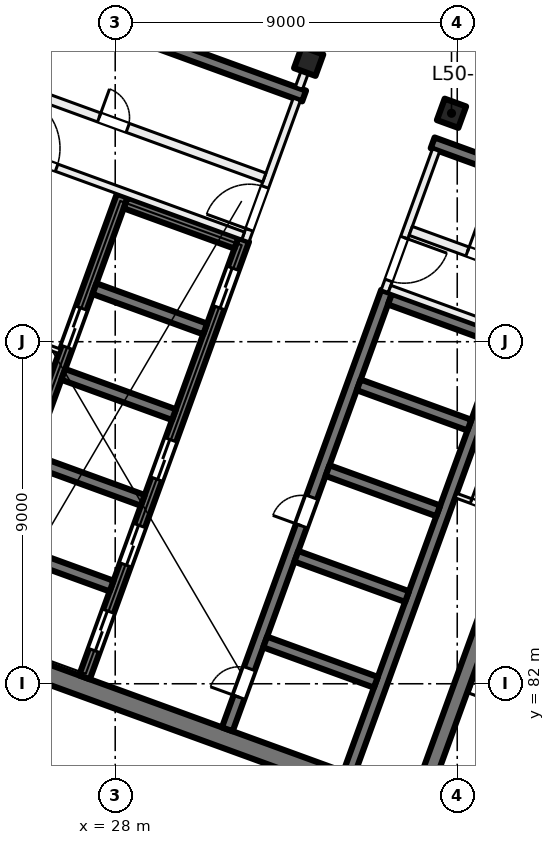
"""IFC4 building model, lengths in metres.
Left out: names, types, materials, properties, quantities, classifications, styles, units other than length and angle.
Written with IfcOpenShell. Run it as: python <this file> out.ifc"""

import sys

from ifc_helpers import new_model, si_unit, direction, frame, frame_2d, origin, origin_2d, place, context, subcontext, project, spatial, rectangle, extrude, element, fill, save


model = new_model("IFC4")
c1 = context("Model", 3, precision=1e-05, world=origin(), true_north=direction((0.0, 1.0)))
c2 = subcontext(c1, "Body", "Model", "MODEL_VIEW")
j1 = project(units=[si_unit("LENGTHUNIT", "METRE"), si_unit("PLANEANGLEUNIT", "RADIAN")], contexts=[c1])
p1 = place(None, origin())
s1 = spatial("IfcSite", under=j1, at=p1, CompositionType="ELEMENT")
p2 = place(p1, origin())
s2 = spatial("IfcBuilding", under=s1, at=p2, CompositionType="ELEMENT")
p3 = place(p2, frame((0.0, 0.0, 212.0)))
s3 = spatial("IfcBuildingStorey", under=s2, at=p3, CompositionType="ELEMENT", Elevation=212.0)
for number, where, z_axis, x_axis in (
    (1, (36.849, 97.011, 0.0), (0.0, 0.0, 1.0), (-0.342, -0.94, 0.0)),
    (2, (33.091, 98.379, 0.0), (0.0, 0.0, 1.0), (-0.342, -0.94, 0.0)),
):
    element("IfcColumn", number, at=place(p3, frame(where, z_axis=z_axis, x_axis=x_axis)), inside=s3, PredefinedType="COLUMN", context=c2, shape_type="SweptSolid", body=[
        extrude(rectangle(XDim=0.6, YDim=0.6, at=origin_2d()), origin(), (0.0, 0.0, 1.0), 4.0),
    ])
p4 = place(p3, frame((35.75, 78.788, 0.0), z_axis=(0.0, 0.0, 1.0), x_axis=(-0.939692894512, 0.342019391267, 0.0)))
e3 = element("IfcWall", 3, at=p4, inside=s3, PredefinedType="SHEAR", context=c2, shape_type="SweptSolid", body=[
    extrude(rectangle(XDim=14.4, YDim=0.5, at=frame_2d((7.2, 0.0))), origin(), (0.0, 0.0, 1.0), 4.0),
])
p5 = place(p3, frame((36.058, 79.048, 0.0), z_axis=(0.0, 0.0, 1.0), x_axis=(0.342016982193, 0.939693771338, 0.0)))
e4 = element("IfcWall", 4, at=p5, inside=s3, PredefinedType="SHEAR", context=c2, shape_type="SweptSolid", body=[
    extrude(rectangle(XDim=7.8, YDim=0.4, at=frame_2d((3.9, 0.0))), origin(), (0.0, 0.0, 1.0), 4.0),
])
p6 = place(p3, frame((30.949, 80.801, 0.0), z_axis=(0.0, 0.0, 1.0), x_axis=(0.342016684409, 0.939693879721, 0.0)))
e5 = element("IfcWall", 5, at=p6, inside=s3, PredefinedType="SHEAR", context=c2, shape_type="SweptSolid", body=[
    extrude(rectangle(XDim=12.25, YDim=0.3, at=frame_2d((6.125, 0.0))), origin(), (0.0, 0.0, 1.0), 4.0),
])
p7 = place(p6, frame((0.9, 0.0, 0.0)))
e6 = element("IfcOpeningElement", 6, at=p7, cuts=e5, PredefinedType="OPENING", context=c2, shape_type="SweptSolid", body=[
    extrude(rectangle(XDim=0.8, YDim=2.1, at=frame_2d((0.4, 1.05))), frame((0.0, 0.16, 0.0), z_axis=(0.0, -1.0, 0.0), x_axis=(1.0, 0.0, 0.0)), (0.0, 0.0, 1.0), 0.32),
])
p8 = place(p6, frame((5.7, 0.0, 0.0)))
e7 = element("IfcOpeningElement", 7, at=p8, cuts=e5, PredefinedType="OPENING", context=c2, shape_type="SweptSolid", body=[
    extrude(rectangle(XDim=0.8, YDim=2.1, at=frame_2d((0.4, 1.05))), frame((0.0, 0.16, 0.0), z_axis=(0.0, -1.0, 0.0), x_axis=(1.0, 0.0, 0.0)), (0.0, 0.0, 1.0), 0.32),
])
p9 = place(p3, frame((34.144, 79.638, 0.0), z_axis=(0.0, 0.0, 1.0), x_axis=(0.342016684409, 0.939693879721, 0.0)))
e8 = element("IfcWall", 8, at=p9, inside=s3, PredefinedType="SHEAR", context=c2, shape_type="SweptSolid", body=[
    extrude(rectangle(XDim=12.25, YDim=0.3, at=frame_2d((6.125, 0.0))), origin(), (0.0, 0.0, 1.0), 4.0),
])
p10 = place(p3, frame((34.858, 82.039, 0.0), z_axis=(0.0, 0.0, 1.0), x_axis=(-0.939689908313, 0.342027595692, 0.0)))
e9 = element("IfcWall", 9, at=p10, inside=s3, PredefinedType="SHEAR", context=c2, shape_type="SweptSolid", body=[
    extrude(rectangle(XDim=3.1, YDim=0.3, at=frame_2d((1.55, 0.0))), origin(), (0.0, 0.0, 1.0), 4.0),
])
p11 = place(p3, frame((35.679, 84.294, 0.0), z_axis=(0.0, 0.0, 1.0), x_axis=(-0.939706007505, 0.341983361377, 0.0)))
e10 = element("IfcWall", 10, at=p11, inside=s3, PredefinedType="SHEAR", context=c2, shape_type="SweptSolid", body=[
    extrude(rectangle(XDim=3.1, YDim=0.3, at=frame_2d((1.55, 0.0))), origin(), (0.0, 0.0, 1.0), 4.0),
])
for number, where, z_axis, x_axis in (
    (11, (36.5, 86.549, 0.0), (0.0, 0.0, 1.0), (-0.94, 0.342, 0.0)),
    (12, (37.321, 88.805, 0.0), (0.0, 0.0, 1.0), (-0.94, 0.342, 0.0)),
    (13, (38.142, 91.06, 0.0), (0.0, 0.0, 1.0), (-0.94, 0.342, 0.0)),
):
    element("IfcWall", number, at=place(p3, frame(where, z_axis=z_axis, x_axis=x_axis)), inside=s3, PredefinedType="SHEAR", context=c2, shape_type="SweptSolid", body=[
        extrude(rectangle(XDim=3.1, YDim=0.3, at=frame_2d((1.55, 0.0))), origin(), (0.0, 0.0, 1.0), 4.0),
    ])
p12 = place(p3, frame((27.191, 82.169, 0.0), z_axis=(0.0, 0.0, 1.0), x_axis=(0.342016684409, 0.939693879721, 0.0)))
e14 = element("IfcWall", 14, at=p12, inside=s3, PredefinedType="SHEAR", context=c2, shape_type="SweptSolid", body=[
    extrude(rectangle(XDim=12.25, YDim=0.3, at=frame_2d((6.125, 0.0))), origin(), (0.0, 0.0, 1.0), 4.0),
])
p13 = place(p12, frame((0.75, 0.0, 0.0)))
e15 = element("IfcOpeningElement", 15, at=p13, cuts=e14, PredefinedType="OPENING", context=c2, shape_type="SweptSolid", body=[
    extrude(rectangle(XDim=1.1, YDim=2.1, at=frame_2d((0.55, 1.05))), frame((0.0, 0.16, 0.0), z_axis=(0.0, -1.0, 0.0), x_axis=(1.0, 0.0, 0.0)), (0.0, 0.0, 1.0), 0.32),
])
p14 = place(p12, frame((3.15, 0.0, 0.0)))
e16 = element("IfcOpeningElement", 16, at=p14, cuts=e14, PredefinedType="OPENING", context=c2, shape_type="SweptSolid", body=[
    extrude(rectangle(XDim=1.1, YDim=2.1, at=frame_2d((0.55, 1.05))), frame((0.0, 0.16, 0.0), z_axis=(0.0, -1.0, 0.0), x_axis=(1.0, 0.0, 0.0)), (0.0, 0.0, 1.0), 0.32),
])
p15 = place(p12, frame((5.55, 0.0, 0.0)))
e17 = element("IfcOpeningElement", 17, at=p15, cuts=e14, PredefinedType="OPENING", context=c2, shape_type="SweptSolid", body=[
    extrude(rectangle(XDim=1.1, YDim=2.1, at=frame_2d((0.55, 1.05))), frame((0.0, 0.16, 0.0), z_axis=(0.0, -1.0, 0.0), x_axis=(1.0, 0.0, 0.0)), (0.0, 0.0, 1.0), 0.32),
])
p16 = place(p12, frame((10.35, 0.0, 0.0)))
e18 = element("IfcOpeningElement", 18, at=p16, cuts=e14, PredefinedType="OPENING", context=c2, shape_type="SweptSolid", body=[
    extrude(rectangle(XDim=1.1, YDim=2.1, at=frame_2d((0.55, 1.05))), frame((0.0, 0.16, 0.0), z_axis=(0.0, -1.0, 0.0), x_axis=(1.0, 0.0, 0.0)), (0.0, 0.0, 1.0), 0.32),
])
p17 = place(p3, frame((23.996, 83.332, 0.0), z_axis=(0.0, 0.0, 1.0), x_axis=(0.342016684409, 0.939693879721, 0.0)))
e19 = element("IfcWall", 19, at=p17, inside=s3, PredefinedType="SHEAR", context=c2, shape_type="SweptSolid", body=[
    extrude(rectangle(XDim=12.25, YDim=0.3, at=frame_2d((6.125, 0.0))), origin(), (0.0, 0.0, 1.0), 4.0),
])
p18 = place(p17, frame((8.0, 0.0, 0.0)))
e20 = element("IfcOpeningElement", 20, at=p18, cuts=e19, PredefinedType="OPENING", context=c2, shape_type="SweptSolid", body=[
    extrude(rectangle(XDim=1.1, YDim=2.1, at=frame_2d((0.55, 1.05))), frame((0.0, 0.16, 0.0), z_axis=(0.0, -1.0, 0.0), x_axis=(1.0, 0.0, 0.0)), (0.0, 0.0, 1.0), 0.32),
])
for number, where, z_axis, x_axis in (
    (21, (27.905, 84.57, 0.0), (0.0, 0.0, 1.0), (-0.94, 0.342, 0.0)),
    (22, (28.726, 86.825, 0.0), (0.0, 0.0, 1.0), (-0.94, 0.342, 0.0)),
    (23, (29.546, 89.08, 0.0), (0.0, 0.0, 1.0), (-0.94, 0.342, 0.0)),
):
    element("IfcWall", number, at=place(p3, frame(where, z_axis=z_axis, x_axis=x_axis)), inside=s3, PredefinedType="SHEAR", context=c2, shape_type="SweptSolid", body=[
        extrude(rectangle(XDim=3.1, YDim=0.3, at=frame_2d((1.55, 0.0))), origin(), (0.0, 0.0, 1.0), 4.0),
    ])
for number, where, z_axis, x_axis in (
    (24, (30.367, 91.336, 0.0), (0.0, 0.0, 1.0), (-0.94, 0.342, 0.0)),
    (25, (31.188, 93.591, 0.0), (0.0, 0.0, 1.0), (-0.94, 0.342, 0.0)),
):
    element("IfcWall", number, at=place(p3, frame(where, z_axis=z_axis, x_axis=x_axis)), inside=s3, PredefinedType="SHEAR", context=c2, shape_type="SweptSolid", body=[
        extrude(rectangle(XDim=3.1, YDim=0.3, at=frame_2d((1.55, 0.0))), origin(), (0.0, 0.0, 1.0), 4.0),
    ])
p19 = place(p3, frame((44.529, 93.258, 0.0), z_axis=(0.0, 0.0, 1.0), x_axis=(-0.9396917844, 0.342022441267, 0.0)))
e26 = element("IfcWall", 26, at=p19, inside=s3, PredefinedType="SHEAR", context=c2, shape_type="SweptSolid", body=[
    extrude(rectangle(XDim=8.7, YDim=0.3, at=frame_2d((4.35, 0.0))), origin(), (0.0, 0.0, 1.0), 4.0),
])
p20 = place(p3, frame((32.971, 97.465, 0.0), z_axis=(0.0, 0.0, 1.0), x_axis=(-0.939695066972, 0.34201342241, 0.0)))
e27 = element("IfcWall", 27, at=p20, inside=s3, PredefinedType="SHEAR", context=c2, shape_type="SweptSolid", body=[
    extrude(rectangle(XDim=8.7, YDim=0.3, at=frame_2d((4.35, 0.0))), origin(), (0.0, 0.0, 1.0), 4.0),
])
p21 = place(p3, frame((31.427, 93.663, 0.0), z_axis=(0.0, 0.0, 1.0), x_axis=(0.342030870568, 0.93968871632, 0.0)))
e28 = element("IfcWall", 28, at=p21, inside=s3, PredefinedType="PARTITIONING", context=c2, shape_type="SweptSolid", body=[
    extrude(rectangle(XDim=3.95, YDim=0.2, at=frame_2d((1.975, 0.0))), origin(), (0.0, 0.0, 1.0), 3.625),
])
p22 = place(p21, frame((0.3, 0.0, 0.0)))
e29 = element("IfcOpeningElement", 29, at=p22, cuts=e28, PredefinedType="OPENING", context=c2, shape_type="SweptSolid", body=[
    extrude(rectangle(XDim=1.2, YDim=2.1, at=frame_2d((0.6, 1.05))), frame((0.0, 0.11, 0.0), z_axis=(0.0, -1.0, 0.0), x_axis=(1.0, 0.0, 0.0)), (0.0, 0.0, 1.0), 0.22),
])
p23 = place(p3, frame((23.427, 96.682, 0.0), z_axis=(0.0, 0.0, 1.0), x_axis=(0.939690465531, -0.342026064782, 0.0)))
e30 = element("IfcWall", 30, at=p23, inside=s3, PredefinedType="PARTITIONING", context=c2, shape_type="SweptSolid", body=[
    extrude(rectangle(XDim=8.45, YDim=0.2, at=frame_2d((4.225, 0.0))), origin(), (0.0, 0.0, 1.0), 3.625),
])
p24 = place(p23, frame((1.725, 0.0, 0.0)))
e31 = element("IfcOpeningElement", 31, at=p24, cuts=e30, PredefinedType="OPENING", context=c2, shape_type="SweptSolid", body=[
    extrude(rectangle(XDim=1.5, YDim=2.1, at=frame_2d((0.75, 1.05))), frame((0.0, 0.11, 0.0), z_axis=(0.0, -1.0, 0.0), x_axis=(1.0, 0.0, 0.0)), (0.0, 0.0, 1.0), 0.22),
])
p25 = place(p3, frame((23.983, 98.208, 0.0), z_axis=(0.0, 0.0, 1.0), x_axis=(0.939699751196, -0.342000552051, 0.0)))
e32 = element("IfcWall", 32, at=p25, inside=s3, PredefinedType="PARTITIONING", context=c2, shape_type="SweptSolid", body=[
    extrude(rectangle(XDim=8.45, YDim=0.25, at=frame_2d((4.225, 0.0))), origin(), (0.0, 0.0, 1.0), 3.625),
])
p26 = place(p25, frame((3.825, 0.0, 0.0)))
e33 = element("IfcOpeningElement", 33, at=p26, cuts=e32, PredefinedType="OPENING", context=c2, shape_type="SweptSolid", body=[
    extrude(rectangle(XDim=0.8, YDim=2.1, at=frame_2d((0.4, 1.05))), frame((0.0, 0.135, 0.0), z_axis=(0.0, -1.0, 0.0), x_axis=(1.0, 0.0, 0.0)), (0.0, 0.0, 1.0), 0.27),
])
p27 = place(p3, frame((24.985, 91.312, 0.0), z_axis=(0.0, 0.0, 1.0), x_axis=(0.939719959755, -0.341945020783, 0.0)))
e34 = element("IfcWall", 34, at=p27, inside=s3, PredefinedType="PARTITIONING", context=c2, shape_type="SweptSolid", body=[
    extrude(rectangle(XDim=1.65, YDim=0.125, at=frame_2d((0.825, 0.0))), origin(), (0.0, 0.0, 1.0), 3.625),
])
p28 = place(p27, frame((0.425, 0.0, 0.0)))
e35 = element("IfcOpeningElement", 35, at=p28, cuts=e34, PredefinedType="OPENING", context=c2, shape_type="SweptSolid", body=[
    extrude(rectangle(XDim=0.8, YDim=2.1, at=frame_2d((0.4, 1.05))), frame((0.0, 0.073, 0.0), z_axis=(0.0, -1.0, 0.0), x_axis=(1.0, 0.0, 0.0)), (0.0, 0.0, 1.0), 0.145),
])
p29 = place(p3, frame((36.443, 96.041, 0.0), z_axis=(0.0, 0.0, 1.0), x_axis=(-0.341996156931, -0.939701350773, 0.0)))
e36 = element("IfcWall", 36, at=p29, inside=s3, PredefinedType="PARTITIONING", context=c2, shape_type="SweptSolid", body=[
    extrude(rectangle(XDim=3.95, YDim=0.2, at=frame_2d((1.975, 0.0))), origin(), (0.0, 0.0, 1.0), 3.625),
])
p30 = place(p29, frame((2.45, 0.0, 0.0)))
e37 = element("IfcOpeningElement", 37, at=p30, cuts=e36, PredefinedType="OPENING", context=c2, shape_type="SweptSolid", body=[
    extrude(rectangle(XDim=1.2, YDim=2.1, at=frame_2d((0.6, 1.05))), frame((0.0, 0.11, 0.0), z_axis=(0.0, -1.0, 0.0), x_axis=(1.0, 0.0, 0.0)), (0.0, 0.0, 1.0), 0.22),
])
p31 = place(p3, frame((35.22, 92.389, 0.0), z_axis=(0.0, 0.0, 1.0), x_axis=(0.939690465531, -0.342026064782, 0.0)))
e38 = element("IfcWall", 38, at=p31, inside=s3, PredefinedType="PARTITIONING", context=c2, shape_type="SweptSolid", body=[
    extrude(rectangle(XDim=8.45, YDim=0.2, at=frame_2d((4.225, 0.0))), origin(), (0.0, 0.0, 1.0), 3.625),
])
p32 = place(p31, frame((5.225, 0.0, 0.0)))
e39 = element("IfcOpeningElement", 39, at=p32, cuts=e38, PredefinedType="OPENING", context=c2, shape_type="SweptSolid", body=[
    extrude(rectangle(XDim=1.5, YDim=2.1, at=frame_2d((0.75, 1.05))), frame((0.0, 0.11, 0.0), z_axis=(0.0, -1.0, 0.0), x_axis=(1.0, 0.0, 0.0)), (0.0, 0.0, 1.0), 0.22),
])
p33 = place(p3, frame((35.776, 93.916, 0.0), z_axis=(0.0, 0.0, 1.0), x_axis=(0.939690465531, -0.342026064782, 0.0)))
e40 = element("IfcWall", 40, at=p33, inside=s3, PredefinedType="PARTITIONING", context=c2, shape_type="SweptSolid", body=[
    extrude(rectangle(XDim=8.45, YDim=0.25, at=frame_2d((4.225, 0.0))), origin(), (0.0, 0.0, 1.0), 3.625),
])
p34 = place(p33, frame((1.59, 0.0, 0.0)))
e41 = element("IfcOpeningElement", 41, at=p34, cuts=e40, PredefinedType="OPENING", context=c2, shape_type="SweptSolid", body=[
    extrude(rectangle(XDim=1.0, YDim=2.1, at=frame_2d((0.5, 1.05))), frame((0.0, 0.135, 0.0), z_axis=(0.0, -1.0, 0.0), x_axis=(1.0, 0.0, 0.0)), (0.0, 0.0, 1.0), 0.27),
])
p35 = place(p33, frame((5.865, 0.0, 0.0)))
e42 = element("IfcOpeningElement", 42, at=p35, cuts=e40, PredefinedType="OPENING", context=c2, shape_type="SweptSolid", body=[
    extrude(rectangle(XDim=1.0, YDim=2.1, at=frame_2d((0.5, 1.05))), frame((0.0, 0.135, 0.0), z_axis=(0.0, -1.0, 0.0), x_axis=(1.0, 0.0, 0.0)), (0.0, 0.0, 1.0), 0.27),
])
p36 = place(p3, frame((36.966, 86.952, 0.0), z_axis=(0.0, 0.0, 1.0), x_axis=(0.939672407396, -0.342075674051, 0.0)))
e43 = element("IfcWall", 43, at=p36, inside=s3, PredefinedType="PARTITIONING", context=c2, shape_type="SweptSolid", body=[
    extrude(rectangle(XDim=1.65, YDim=0.125, at=frame_2d((0.825, 0.0))), origin(), (0.0, 0.0, 1.0), 3.625),
])
p37 = place(p36, frame((0.425, 0.0, 0.0)))
e44 = element("IfcOpeningElement", 44, at=p37, cuts=e43, PredefinedType="OPENING", context=c2, shape_type="SweptSolid", body=[
    extrude(rectangle(XDim=0.8, YDim=2.1, at=frame_2d((0.4, 1.05))), frame((0.0, 0.073, 0.0), z_axis=(0.0, -1.0, 0.0), x_axis=(1.0, 0.0, 0.0)), (0.0, 0.0, 1.0), 0.145),
])
p38 = place(p3, frame((32.834, 97.674, 0.0), z_axis=(0.0, 0.0, 1.0), x_axis=(0.342017493073, 0.939693585395, 0.0)))
e45 = element("IfcWall", 45, at=p38, inside=s3, PredefinedType="PARTITIONING", context=c2, shape_type="SweptSolid", body=[
    extrude(rectangle(XDim=3.5, YDim=0.2, at=frame_2d((1.75, 0.0))), origin(), (0.0, 0.0, 1.0), 3.625),
])
p39 = place(p3, frame((34.091, 100.835, 0.0), z_axis=(0.0, 0.0, 1.0), x_axis=(0.939702148643, -0.341993964619, 0.0)))
e46 = element("IfcWall", 46, at=p39, inside=s3, PredefinedType="PARTITIONING", context=c2, shape_type="SweptSolid", body=[
    extrude(rectangle(XDim=10.0, YDim=0.2, at=frame_2d((5.0, 0.0))), origin(), (0.0, 0.0, 1.0), 3.625),
])
p40 = place(p39, frame((4.4, 0.0, 0.0)))
e47 = element("IfcOpeningElement", 47, at=p40, cuts=e46, PredefinedType="OPENING", context=c2, shape_type="SweptSolid", body=[
    extrude(rectangle(XDim=1.0, YDim=2.1, at=frame_2d((0.5, 1.05))), frame((0.0, 0.11, 0.0), z_axis=(0.0, -1.0, 0.0), x_axis=(1.0, 0.0, 0.0)), (0.0, 0.0, 1.0), 0.22),
])
p41 = place(p13, origin())
e48 = element("IfcDoor", 48, at=p41, inside=s3, OperationType="DOUBLE_DOOR_SLIDING", PredefinedType="DOOR", context=c2, shape_type="SweptSolid", body=[
    extrude(rectangle(XDim=1.1, YDim=2.1, at=frame_2d((0.55, 1.05))), frame((0.0, 0.025, 0.0), z_axis=(0.0, -1.0, 0.0), x_axis=(1.0, 0.0, 0.0)), (0.0, 0.0, 1.0), 0.05),
])
fill(e15, e48)
p42 = place(p14, origin())
e49 = element("IfcDoor", 49, at=p42, inside=s3, OperationType="DOUBLE_DOOR_SLIDING", PredefinedType="DOOR", context=c2, shape_type="SweptSolid", body=[
    extrude(rectangle(XDim=1.1, YDim=2.1, at=frame_2d((0.55, 1.05))), frame((0.0, 0.025, 0.0), z_axis=(0.0, -1.0, 0.0), x_axis=(1.0, 0.0, 0.0)), (0.0, 0.0, 1.0), 0.05),
])
fill(e16, e49)
p43 = place(p15, origin())
e50 = element("IfcDoor", 50, at=p43, inside=s3, OperationType="DOUBLE_DOOR_SLIDING", PredefinedType="DOOR", context=c2, shape_type="SweptSolid", body=[
    extrude(rectangle(XDim=1.1, YDim=2.1, at=frame_2d((0.55, 1.05))), frame((0.0, 0.025, 0.0), z_axis=(0.0, -1.0, 0.0), x_axis=(1.0, 0.0, 0.0)), (0.0, 0.0, 1.0), 0.05),
])
fill(e17, e50)
p44 = place(p16, origin())
e51 = element("IfcDoor", 51, at=p44, inside=s3, OperationType="DOUBLE_DOOR_SLIDING", PredefinedType="DOOR", context=c2, shape_type="SweptSolid", body=[
    extrude(rectangle(XDim=1.1, YDim=2.1, at=frame_2d((0.55, 1.05))), frame((0.0, 0.025, 0.0), z_axis=(0.0, -1.0, 0.0), x_axis=(1.0, 0.0, 0.0)), (0.0, 0.0, 1.0), 0.05),
])
fill(e18, e51)
p45 = place(p7, origin())
e52 = element("IfcDoor", 52, at=p45, inside=s3, OperationType="SINGLE_SWING_LEFT", PredefinedType="DOOR", context=c2, shape_type="SweptSolid", body=[
    extrude(rectangle(XDim=0.8, YDim=2.1, at=frame_2d((0.4, 1.05))), frame((0.0, 0.025, 0.0), z_axis=(0.0, -1.0, 0.0), x_axis=(1.0, 0.0, 0.0)), (0.0, 0.0, 1.0), 0.05),
])
fill(e6, e52)
p46 = place(p8, origin())
e53 = element("IfcDoor", 53, at=p46, inside=s3, OperationType="SINGLE_SWING_RIGHT", PredefinedType="DOOR", context=c2, shape_type="SweptSolid", body=[
    extrude(rectangle(XDim=0.8, YDim=2.1, at=frame_2d((0.4, 1.05))), frame((0.0, 0.025, 0.0), z_axis=(0.0, -1.0, 0.0), x_axis=(1.0, 0.0, 0.0)), (0.0, 0.0, 1.0), 0.05),
])
fill(e7, e53)
p47 = place(p22, origin())
e54 = element("IfcDoor", 54, at=p47, inside=s3, OperationType="DOUBLE_DOOR_SINGLE_SWING", PredefinedType="DOOR", context=c2, shape_type="SweptSolid", body=[
    extrude(rectangle(XDim=1.2, YDim=2.1, at=frame_2d((0.6, 1.05))), frame((0.0, 0.025, 0.0), z_axis=(0.0, -1.0, 0.0), x_axis=(1.0, 0.0, 0.0)), (0.0, 0.0, 1.0), 0.05),
])
fill(e29, e54)
p48 = place(p24, origin())
e55 = element("IfcDoor", 55, at=p48, inside=s3, OperationType="DOUBLE_DOOR_SINGLE_SWING", PredefinedType="DOOR", context=c2, shape_type="SweptSolid", body=[
    extrude(rectangle(XDim=1.5, YDim=2.1, at=frame_2d((0.75, 1.05))), frame((0.0, 0.025, 0.0), z_axis=(0.0, -1.0, 0.0), x_axis=(1.0, 0.0, 0.0)), (0.0, 0.0, 1.0), 0.05),
])
fill(e31, e55)
p49 = place(p26, origin())
e56 = element("IfcDoor", 56, at=p49, inside=s3, OperationType="SINGLE_SWING_LEFT", PredefinedType="DOOR", context=c2, shape_type="SweptSolid", body=[
    extrude(rectangle(XDim=0.8, YDim=2.1, at=frame_2d((0.4, 1.05))), frame((0.0, 0.025, 0.0), z_axis=(0.0, -1.0, 0.0), x_axis=(1.0, 0.0, 0.0)), (0.0, 0.0, 1.0), 0.05),
])
fill(e33, e56)
p50 = place(p30, origin())
e57 = element("IfcDoor", 57, at=p50, inside=s3, OperationType="DOUBLE_DOOR_SINGLE_SWING", PredefinedType="DOOR", context=c2, shape_type="SweptSolid", body=[
    extrude(rectangle(XDim=1.2, YDim=2.1, at=frame_2d((0.6, 1.05))), frame((0.0, 0.025, 0.0), z_axis=(0.0, -1.0, 0.0), x_axis=(1.0, 0.0, 0.0)), (0.0, 0.0, 1.0), 0.05),
])
fill(e37, e57)
p51 = place(p37, origin())
e58 = element("IfcDoor", 58, at=p51, inside=s3, OperationType="SINGLE_SWING_LEFT", PredefinedType="DOOR", context=c2, shape_type="SweptSolid", body=[
    extrude(rectangle(XDim=0.8, YDim=2.1, at=frame_2d((0.4, 1.05))), frame((0.0, 0.025, 0.0), z_axis=(0.0, -1.0, 0.0), x_axis=(1.0, 0.0, 0.0)), (0.0, 0.0, 1.0), 0.05),
])
fill(e44, e58)
p52 = place(p34, origin())
e59 = element("IfcDoor", 59, at=p52, inside=s3, OperationType="SINGLE_SWING_RIGHT", PredefinedType="DOOR", context=c2, shape_type="SweptSolid", body=[
    extrude(rectangle(XDim=1.0, YDim=2.1, at=frame_2d((0.5, 1.05))), frame((0.0, 0.025, 0.0), z_axis=(0.0, -1.0, 0.0), x_axis=(1.0, 0.0, 0.0)), (0.0, 0.0, 1.0), 0.05),
])
fill(e41, e59)
p53 = place(p18, origin())
e60 = element("IfcDoor", 60, at=p53, inside=s3, OperationType="DOUBLE_DOOR_SLIDING", PredefinedType="DOOR", context=c2, shape_type="SweptSolid", body=[
    extrude(rectangle(XDim=1.1, YDim=2.1, at=frame_2d((0.55, 1.05))), frame((0.0, 0.025, 0.0), z_axis=(0.0, -1.0, 0.0), x_axis=(1.0, 0.0, 0.0)), (0.0, 0.0, 1.0), 0.05),
])
fill(e20, e60)
save(model, sys.argv[1])
